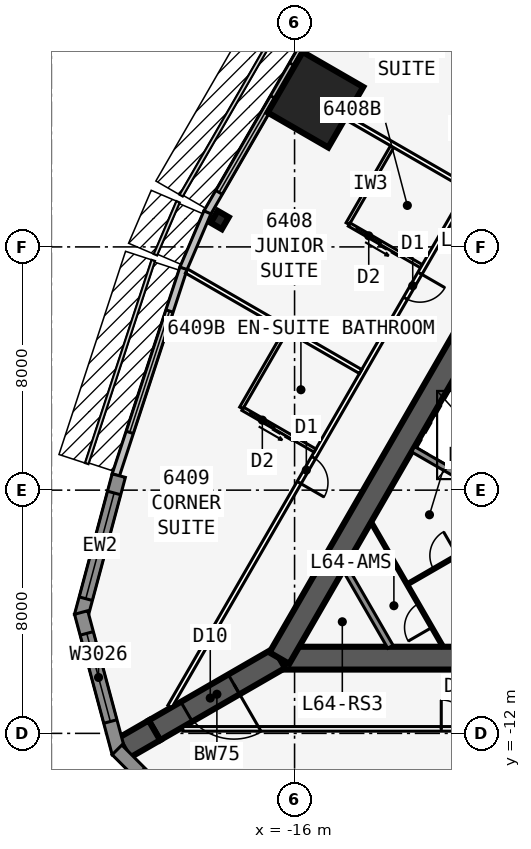
"""IFC4 building model, lengths in metres.
Left out: names, types, materials, properties, quantities, classifications, styles, units other than length and angle.
Written with IfcOpenShell. Run it as: python <this file> out.ifc"""

import sys

from ifc_helpers import new_model, si_unit, direction, frame, frame_2d, origin, origin_2d, place, context, subcontext, project, spatial, polyline, rectangle, i_section, outline, extrude, element, fill, save


model = new_model("IFC4")
c1 = context("Model", 3, precision=1e-05, world=origin(), true_north=direction((0.0, 1.0)))
c2 = subcontext(c1, "Body", "Model", "MODEL_VIEW")
j1 = project(units=[si_unit("LENGTHUNIT", "METRE"), si_unit("PLANEANGLEUNIT", "RADIAN")], contexts=[c1])
p1 = place(None, origin())
s1 = spatial("IfcSite", under=j1, at=p1, CompositionType="ELEMENT")
p2 = place(p1, origin())
s2 = spatial("IfcBuilding", under=s1, at=p2, CompositionType="ELEMENT")
p3 = place(p2, frame((0.0, 0.0, 242.9)))
s3 = spatial("IfcBuildingStorey", under=s2, at=p3, CompositionType="ELEMENT", Elevation=242.9)
p4 = place(p3, frame((-16.5, -9.526, 0.0), z_axis=(0.0, 0.0, 1.0), x_axis=(1.0, 0.0, 0.0)))
e1 = element("IfcWall", 1, at=p4, inside=s3, PredefinedType="SHEAR", context=c2, shape_type="SweptSolid", body=[
    extrude(rectangle(XDim=33.0, YDim=0.75, at=frame_2d((16.5, 0.0))), origin(), (0.0, 0.0, 1.0), 3.6),
])
p5 = place(p4, frame((14.05, 0.0, 0.0)))
e2 = element("IfcOpeningElement", 2, at=p5, cuts=e1, PredefinedType="OPENING", context=c2, shape_type="SweptSolid", body=[
    extrude(rectangle(XDim=1.8, YDim=2.13, at=frame_2d((0.9, 1.065))), frame((0.0, 0.385, 0.0), z_axis=(0.0, -1.0, 0.0), x_axis=(1.0, 0.0, 0.0)), (0.0, 0.0, 1.0), 0.77),
])
p6 = place(p3, frame((0.0, 19.052, 0.0), z_axis=(0.0, 0.0, 1.0), x_axis=(-0.499999749417, -0.866025548458, 0.0)))
e3 = element("IfcWall", 3, at=p6, inside=s3, PredefinedType="SHEAR", context=c2, shape_type="SweptSolid", body=[
    extrude(rectangle(XDim=33.0, YDim=0.75, at=frame_2d((16.5, 0.0))), origin(), (0.0, 0.0, 1.0), 3.6),
])
p7 = place(p6, frame((14.15, 0.0, 0.0)))
e4 = element("IfcOpeningElement", 4, at=p7, cuts=e3, PredefinedType="OPENING", context=c2, shape_type="SweptSolid", body=[
    extrude(rectangle(XDim=1.8, YDim=2.13, at=frame_2d((0.9, 1.065))), frame((0.0, 0.385, 0.0), z_axis=(0.0, -1.0, 0.0), x_axis=(1.0, 0.0, 0.0)), (0.0, 0.0, 1.0), 0.77),
])
p8 = place(p6, frame((12.6, 0.0, 0.0)))
e5 = element("IfcOpeningElement", 5, at=p8, cuts=e3, PredefinedType="OPENING", context=c2, shape_type="SweptSolid", body=[
    extrude(rectangle(XDim=1.0, YDim=2.13, at=frame_2d((0.5, 1.065))), frame((0.0, 0.385, 0.0), z_axis=(0.0, -1.0, 0.0), x_axis=(1.0, 0.0, 0.0)), (0.0, 0.0, 1.0), 0.77),
])
p9 = place(p3, frame((-9.329, -4.256, 0.0), z_axis=(0.0, 0.0, 1.0), x_axis=(-0.866022944154, 0.50000426018, 0.0)))
e6 = element("IfcWall", 6, at=p9, inside=s3, PredefinedType="SOLIDWALL", context=c2, shape_type="SweptSolid", body=[
    extrude(rectangle(XDim=3.2, YDim=0.2, at=frame_2d((1.6, 0.0))), origin(), (0.0, 0.0, 1.0), 3.435),
])
p10 = place(p3, frame((-16.5, -9.526, 0.0), z_axis=(0.0, 0.0, 1.0), x_axis=(-0.866031398331, -0.499989616998, 0.0)))
e7 = element("IfcWall", 7, at=p10, inside=s3, PredefinedType="SHEAR", context=c2, shape_type="SweptSolid", body=[
    extrude(rectangle(XDim=4.746, YDim=0.75, at=frame_2d((2.373, 0.0))), origin(), (0.0, 0.0, 1.0), 3.6),
])
p11 = place(p10, frame((1.725, 0.0, 0.0)))
e8 = element("IfcOpeningElement", 8, at=p11, cuts=e7, PredefinedType="OPENING", context=c2, shape_type="SweptSolid", body=[
    extrude(rectangle(XDim=1.8, YDim=2.13, at=frame_2d((0.9, 1.065))), frame((0.0, 0.385, 0.0), z_axis=(0.0, -1.0, 0.0), x_axis=(1.0, 0.0, 0.0)), (0.0, 0.0, 1.0), 0.77),
])
p12 = place(p3, frame((-20.61, -11.899, 0.0), z_axis=(0.0, 0.0, 1.0), x_axis=(-0.866009537788, -0.500027479704, 0.0)))
e9 = element("IfcWall", 9, at=p12, inside=s3, PredefinedType="SHEAR", context=c2, shape_type="SweptSolid", body=[
    extrude(rectangle(XDim=1.155, YDim=0.75, at=frame_2d((0.577, 0.0))), origin(), (0.0, 0.0, 1.0), 3.6),
])
p13 = place(p3, frame((-18.461, 4.885, 0.0), z_axis=(0.0, 0.0, 1.0), x_axis=(-0.866025403784, 0.5, 0.0)))
e10 = element("IfcColumn", 10, at=p13, inside=s3, PredefinedType="COLUMN", context=c2, shape_type="SweptSolid", body=[
    extrude(i_section(OverallWidth=0.419, OverallDepth=0.455, WebThickness=0.042, FlangeThickness=0.068, at=origin_2d()), origin(), (0.0, 0.0, 1.0), 3.6),
])
p14 = place(p3, frame((-15.312, 8.84, 0.0), z_axis=(0.0, 0.0, 1.0), x_axis=(-0.866025403784, 0.5, 0.0)))
e11 = element("IfcColumn", 11, at=p14, inside=s3, PredefinedType="COLUMN", context=c2, shape_type="SweptSolid", body=[
    extrude(rectangle(XDim=2.3, YDim=2.3, at=origin_2d()), origin(), (0.0, 0.0, 1.0), 3.6),
])
p15 = place(p3, frame((-13.873, 13.783, 0.0), z_axis=(0.0, 0.0, 1.0), x_axis=(-0.499993662806, -0.866029062534, 0.0)))
e12 = element("IfcWall", 12, at=p15, inside=s3, PredefinedType="STANDARD", context=c2, shape_type="SweptSolid", body=[
    extrude(rectangle(XDim=10.0, YDim=0.25, at=frame_2d((5.0, 0.0))), origin(), (0.0, 0.0, 1.0), 3.435),
])
p16 = place(p15, frame((0.775, 0.0, 0.45)))
e13 = element("IfcOpeningElement", 13, at=p16, cuts=e12, PredefinedType="OPENING", context=c2, shape_type="SweptSolid", body=[
    extrude(rectangle(XDim=3.6, YDim=2.6, at=frame_2d((1.8, 1.3))), frame((0.0, 0.135, 0.0), z_axis=(0.0, -1.0, 0.0), x_axis=(1.0, 0.0, 0.0)), (0.0, 0.0, 1.0), 0.27),
])
p17 = place(p15, frame((5.625, 0.0, 0.45)))
e14 = element("IfcOpeningElement", 14, at=p17, cuts=e12, PredefinedType="OPENING", context=c2, shape_type="SweptSolid", body=[
    extrude(rectangle(XDim=3.6, YDim=2.6, at=frame_2d((1.8, 1.3))), frame((0.0, 0.135, 0.0), z_axis=(0.0, -1.0, 0.0), x_axis=(1.0, 0.0, 0.0)), (0.0, 0.0, 1.0), 0.27),
])
p18 = place(p3, frame((-18.866, 5.136, 0.0), z_axis=(0.0, 0.0, 1.0), x_axis=(-0.393290226175, -0.91941437774, 0.0)))
e15 = element("IfcWall", 15, at=p18, inside=s3, PredefinedType="STANDARD", context=c2, shape_type="SweptSolid", body=[
    extrude(rectangle(XDim=2.014, YDim=0.25, at=frame_2d((1.007, 0.0))), origin(), (0.0, 0.0, 1.0), 3.435),
])
p19 = place(p3, frame((-19.654, 3.294, 0.0), z_axis=(0.0, 0.0, 1.0), x_axis=(-0.311328857048, -0.95030223759, 0.0)))
e16 = element("IfcWall", 16, at=p19, inside=s3, PredefinedType="STANDARD", context=c2, shape_type="SweptSolid", body=[
    extrude(rectangle(XDim=7.153, YDim=0.25, at=frame_2d((3.576, 0.0))), origin(), (0.0, 0.0, 1.0), 3.435),
])
p20 = place(p19, frame((1.476, 0.0, 0.45)))
e17 = element("IfcOpeningElement", 17, at=p20, cuts=e16, PredefinedType="OPENING", context=c2, shape_type="SweptSolid", body=[
    extrude(rectangle(XDim=4.2, YDim=2.6, at=frame_2d((2.1, 1.3))), frame((0.0, 0.135, 0.0), z_axis=(0.0, -1.0, 0.0), x_axis=(1.0, 0.0, 0.0)), (0.0, 0.0, 1.0), 0.27),
])
p21 = place(p3, frame((-21.783, -3.522, 0.0), z_axis=(0.0, 0.0, 1.0), x_axis=(-0.25880328844, -0.965930048136, 0.0)))
e18 = element("IfcWall", 18, at=p21, inside=s3, PredefinedType="SOLIDWALL", context=c2, shape_type="SweptSolid", body=[
    extrude(rectangle(XDim=4.782, YDim=0.45, at=frame_2d((2.391, 0.0))), origin(), (0.0, 0.0, 1.0), 3.435),
])
p22 = place(p21, frame((0.591, 0.0, 0.45)))
e19 = element("IfcOpeningElement", 19, at=p22, cuts=e18, PredefinedType="OPENING", context=c2, shape_type="SweptSolid", body=[
    extrude(rectangle(XDim=3.6, YDim=2.6, at=frame_2d((1.8, 1.3))), frame((0.0, 0.235, 0.0), z_axis=(0.0, -1.0, 0.0), x_axis=(1.0, 0.0, 0.0)), (0.0, 0.0, 1.0), 0.47),
])
p23 = place(p3, frame((-23.02, -8.025, 0.0), z_axis=(0.0, 0.0, 1.0), x_axis=(0.25880328844, -0.965930048136, 0.0)))
e20 = element("IfcWall", 20, at=p23, inside=s3, PredefinedType="SOLIDWALL", context=c2, shape_type="SweptSolid", body=[
    extrude(outline(polyline([(4.782, 0.225), (4.722, 0.225), (4.303, 0.113), (4.273, 0.225), (0.0, 0.225), (0.0, -0.225), (4.782, -0.225), (4.782, 0.225)])), origin(), (0.0, 0.0, 1.0), 3.435),
])
p24 = place(p23, frame((0.711, 0.0, 0.45)))
e21 = element("IfcOpeningElement", 21, at=p24, cuts=e20, PredefinedType="OPENING", context=c2, shape_type="SweptSolid", body=[
    extrude(rectangle(XDim=3.0, YDim=2.6, at=frame_2d((1.5, 1.3))), frame((0.0, 0.235, 0.0), z_axis=(0.0, -1.0, 0.0), x_axis=(1.0, 0.0, 0.0)), (0.0, 0.0, 1.0), 0.47),
])
p25 = place(p3, frame((-21.841, -12.542, 0.0), z_axis=(0.0, 0.0, 1.0), x_axis=(0.707081252484, -0.707132308968, 0.0)))
e22 = element("IfcWall", 22, at=p25, inside=s3, PredefinedType="SOLIDWALL", context=c2, shape_type="SweptSolid", body=[
    extrude(outline(polyline([(4.782, 0.225), (0.509, 0.225), (0.479, 0.113), (0.059, 0.225), (0.0, 0.225), (0.0, -0.225), (4.782, -0.225), (4.782, 0.225)])), origin(), (0.0, 0.0, 1.0), 3.435),
])
p26 = place(p25, frame((1.07, 0.0, 0.45)))
e23 = element("IfcOpeningElement", 23, at=p26, cuts=e22, PredefinedType="OPENING", context=c2, shape_type="SweptSolid", body=[
    extrude(rectangle(XDim=3.0, YDim=2.6, at=frame_2d((1.5, 1.3))), frame((0.0, 0.235, 0.0), z_axis=(0.0, -1.0, 0.0), x_axis=(1.0, 0.0, 0.0)), (0.0, 0.0, 1.0), 0.47),
])
p27 = place(p3, frame((-19.677, -11.851, 0.0), z_axis=(0.0, 0.0, 1.0), x_axis=(1.0, 0.0, 0.0)))
e24 = element("IfcWall", 24, at=p27, inside=s3, PredefinedType="PARTITIONING", context=c2, shape_type="SweptSolid", body=[
    extrude(rectangle(XDim=39.354, YDim=0.15, at=frame_2d((19.677, 0.0))), origin(), (0.0, 0.0, 1.0), 3.435),
])
p28 = place(p27, frame((8.502, 0.0, 0.0)))
e25 = element("IfcOpeningElement", 25, at=p28, cuts=e24, PredefinedType="OPENING", context=c2, shape_type="SweptSolid", body=[
    extrude(rectangle(XDim=0.95, YDim=2.13, at=frame_2d((0.475, 1.065))), frame((0.0, 0.085, 0.0), z_axis=(0.0, -1.0, 0.0), x_axis=(1.0, 0.0, 0.0)), (0.0, 0.0, 1.0), 0.17),
])
p29 = place(p27, frame((15.677, 0.0, 0.0)))
e26 = element("IfcOpeningElement", 26, at=p29, cuts=e24, PredefinedType="OPENING", context=c2, shape_type="SweptSolid", body=[
    extrude(rectangle(XDim=1.0, YDim=2.13, at=frame_2d((0.5, 1.065))), frame((0.0, 0.085, 0.0), z_axis=(0.0, -1.0, 0.0), x_axis=(1.0, 0.0, 0.0)), (0.0, 0.0, 1.0), 0.17),
])
p30 = place(p27, frame((22.902, 0.0, 0.0)))
e27 = element("IfcOpeningElement", 27, at=p30, cuts=e24, PredefinedType="OPENING", context=c2, shape_type="SweptSolid", body=[
    extrude(rectangle(XDim=0.95, YDim=2.13, at=frame_2d((0.475, 1.065))), frame((0.0, 0.085, 0.0), z_axis=(0.0, -1.0, 0.0), x_axis=(1.0, 0.0, 0.0)), (0.0, 0.0, 1.0), 0.17),
])
p31 = place(p27, frame((29.902, 0.0, 0.0)))
e28 = element("IfcOpeningElement", 28, at=p31, cuts=e24, PredefinedType="OPENING", context=c2, shape_type="SweptSolid", body=[
    extrude(rectangle(XDim=0.95, YDim=2.13, at=frame_2d((0.475, 1.065))), frame((0.0, 0.085, 0.0), z_axis=(0.0, -1.0, 0.0), x_axis=(1.0, 0.0, 0.0)), (0.0, 0.0, 1.0), 0.17),
])
p32 = place(p3, frame((-0.425, 22.966, 0.0), z_axis=(0.0, 0.0, 1.0), x_axis=(-0.500000265775, -0.866025250339, 0.0)))
e29 = element("IfcWall", 29, at=p32, inside=s3, PredefinedType="PARTITIONING", context=c2, shape_type="SweptSolid", body=[
    extrude(rectangle(XDim=39.354, YDim=0.15, at=frame_2d((19.677, 0.0))), origin(), (0.0, 0.0, 1.0), 3.435),
])
p33 = place(p32, frame((8.502, 0.0, 0.0)))
e30 = element("IfcOpeningElement", 30, at=p33, cuts=e29, PredefinedType="OPENING", context=c2, shape_type="SweptSolid", body=[
    extrude(rectangle(XDim=0.95, YDim=2.13, at=frame_2d((0.475, 1.065))), frame((0.0, 0.085, 0.0), z_axis=(0.0, -1.0, 0.0), x_axis=(1.0, 0.0, 0.0)), (0.0, 0.0, 1.0), 0.17),
])
p34 = place(p32, frame((15.902, 0.0, 0.0)))
e31 = element("IfcOpeningElement", 31, at=p34, cuts=e29, PredefinedType="OPENING", context=c2, shape_type="SweptSolid", body=[
    extrude(rectangle(XDim=0.95, YDim=2.13, at=frame_2d((0.475, 1.065))), frame((0.0, 0.085, 0.0), z_axis=(0.0, -1.0, 0.0), x_axis=(1.0, 0.0, 0.0)), (0.0, 0.0, 1.0), 0.17),
])
p35 = place(p32, frame((22.902, 0.0, 0.0)))
e32 = element("IfcOpeningElement", 32, at=p35, cuts=e29, PredefinedType="OPENING", context=c2, shape_type="SweptSolid", body=[
    extrude(rectangle(XDim=0.95, YDim=2.13, at=frame_2d((0.475, 1.065))), frame((0.0, 0.085, 0.0), z_axis=(0.0, -1.0, 0.0), x_axis=(1.0, 0.0, 0.0)), (0.0, 0.0, 1.0), 0.17),
])
p36 = place(p32, frame((29.902, 0.0, 0.0)))
e33 = element("IfcOpeningElement", 33, at=p36, cuts=e29, PredefinedType="OPENING", context=c2, shape_type="SweptSolid", body=[
    extrude(rectangle(XDim=0.95, YDim=2.13, at=frame_2d((0.475, 1.065))), frame((0.0, 0.085, 0.0), z_axis=(0.0, -1.0, 0.0), x_axis=(1.0, 0.0, 0.0)), (0.0, 0.0, 1.0), 0.17),
])
p37 = place(p3, frame((-10.329, 5.963, 0.0), z_axis=(0.0, 0.0, 1.0), x_axis=(-0.866011785882, 0.500023586156, 0.0)))
e34 = element("IfcWall", 34, at=p37, inside=s3, PredefinedType="PARTITIONING", context=c2, shape_type="SweptSolid", body=[
    extrude(rectangle(XDim=6.854, YDim=0.15, at=frame_2d((3.427, 0.0))), origin(), (0.0, 0.0, 1.0), 2.678),
])
p38 = place(p3, frame((-13.829, -0.099, 0.0), z_axis=(0.0, 0.0, 1.0), x_axis=(-0.866022562216, 0.500004921708, 0.0)))
e35 = element("IfcWall", 35, at=p38, inside=s3, PredefinedType="PARTITIONING", context=c2, shape_type="SweptSolid", body=[
    extrude(rectangle(XDim=6.609, YDim=0.15, at=frame_2d((3.304, 0.0))), origin(), (0.0, 0.0, 1.0), 2.678),
])
p39 = place(p3, frame((-12.753, 7.363, 0.0), z_axis=(0.0, 0.0, 1.0), x_axis=(-0.50002537861, -0.866010750942, 0.0)))
e36 = element("IfcWall", 36, at=p39, inside=s3, PredefinedType="PLUMBINGWALL", context=c2, shape_type="SweptSolid", body=[
    extrude(rectangle(XDim=3.0, YDim=0.12, at=frame_2d((1.5, 0.0))), origin(), (0.0, 0.0, 1.0), 3.435),
])
p40 = place(p3, frame((-11.829, 3.365, 0.0), z_axis=(0.0, 0.0, 1.0), x_axis=(-0.865997131366, 0.500048966069, 0.0)))
e37 = element("IfcWall", 37, at=p40, inside=s3, PredefinedType="PLUMBINGWALL", context=c2, shape_type="SweptSolid", body=[
    extrude(rectangle(XDim=2.74, YDim=0.12, at=frame_2d((1.37, 0.0))), origin(), (0.0, 0.0, 1.0), 3.435),
])
p41 = place(p40, frame((1.55, 0.0, 0.0)))
e38 = element("IfcOpeningElement", 38, at=p41, cuts=e37, PredefinedType="OPENING", context=c2, shape_type="SweptSolid", body=[
    extrude(rectangle(XDim=0.9, YDim=2.13, at=frame_2d((0.45, 1.065))), frame((0.0, 0.07, 0.0), z_axis=(0.0, -1.0, 0.0), x_axis=(1.0, 0.0, 0.0)), (0.0, 0.0, 1.0), 0.14),
])
p42 = place(p3, frame((-16.253, 1.301, 0.0), z_axis=(0.0, 0.0, 1.0), x_axis=(-0.499990139034, -0.866031096941, 0.0)))
e39 = element("IfcWall", 39, at=p42, inside=s3, PredefinedType="PLUMBINGWALL", context=c2, shape_type="SweptSolid", body=[
    extrude(rectangle(XDim=3.0, YDim=0.12, at=frame_2d((1.5, 0.0))), origin(), (0.0, 0.0, 1.0), 3.435),
])
p43 = place(p3, frame((-15.329, -2.697, 0.0), z_axis=(0.0, 0.0, 1.0), x_axis=(-0.866035715982, 0.499982138324, 0.0)))
e40 = element("IfcWall", 40, at=p43, inside=s3, PredefinedType="PLUMBINGWALL", context=c2, shape_type="SweptSolid", body=[
    extrude(rectangle(XDim=2.74, YDim=0.12, at=frame_2d((1.37, 0.0))), origin(), (0.0, 0.0, 1.0), 3.435),
])
p44 = place(p43, frame((1.55, 0.0, 0.0)))
e41 = element("IfcOpeningElement", 41, at=p44, cuts=e40, PredefinedType="OPENING", context=c2, shape_type="SweptSolid", body=[
    extrude(rectangle(XDim=0.9, YDim=2.13, at=frame_2d((0.45, 1.065))), frame((0.0, 0.07, 0.0), z_axis=(0.0, -1.0, 0.0), x_axis=(1.0, 0.0, 0.0)), (0.0, 0.0, 1.0), 0.14),
])
p45 = place(p3, frame((-12.848, -9.151, 0.0), z_axis=(0.0, 0.0, 1.0), x_axis=(-0.499952404951, 0.866052881055, 0.0)))
e42 = element("IfcWall", 42, at=p45, inside=s3, PredefinedType="SOLIDWALL", context=c2, shape_type="SweptSolid", body=[
    extrude(rectangle(XDim=3.002, YDim=0.2, at=frame_2d((1.501, 0.0))), origin(), (0.0, 0.0, 1.0), 3.435),
])
p46 = place(p3, frame((-11.116, -9.151, 0.0), z_axis=(0.0, 0.0, 1.0), x_axis=(-0.499999210213, 0.866025859768, 0.0)))
e43 = element("IfcWall", 43, at=p46, inside=s3, PredefinedType="PARTITIONING", context=c2, shape_type="SweptSolid", body=[
    extrude(rectangle(XDim=4.734, YDim=0.1, at=frame_2d((2.367, 0.0))), origin(), (0.0, 0.0, 1.0), 3.435),
])
p47 = place(p46, frame((0.734, 0.0, 0.0)))
e44 = element("IfcOpeningElement", 44, at=p47, cuts=e43, PredefinedType="OPENING", context=c2, shape_type="SweptSolid", body=[
    extrude(rectangle(XDim=0.9, YDim=2.13, at=frame_2d((0.45, 1.065))), frame((0.0, 0.06, 0.0), z_axis=(0.0, -1.0, 0.0), x_axis=(1.0, 0.0, 0.0)), (0.0, 0.0, 1.0), 0.12),
])
p48 = place(p3, frame((-12.3, -7.101, 0.0), z_axis=(0.0, 0.0, 1.0), x_axis=(0.866022978719, 0.500004200313, 0.0)))
e45 = element("IfcWall", 45, at=p48, inside=s3, PredefinedType="PARTITIONING", context=c2, shape_type="SweptSolid", body=[
    extrude(rectangle(XDim=2.425, YDim=0.1, at=frame_2d((1.213, 0.0))), origin(), (0.0, 0.0, 1.0), 3.435),
])
p49 = place(p48, frame((1.005, 0.0, 0.0)))
e46 = element("IfcOpeningElement", 46, at=p49, cuts=e45, PredefinedType="OPENING", context=c2, shape_type="SweptSolid", body=[
    extrude(rectangle(XDim=0.9, YDim=2.13, at=frame_2d((0.45, 1.065))), frame((0.0, 0.06, 0.0), z_axis=(0.0, -1.0, 0.0), x_axis=(1.0, 0.0, 0.0)), (0.0, 0.0, 1.0), 0.12),
])
p50 = place(p16, origin())
e47 = element("IfcWindow", 47, at=p50, inside=s3, PartitioningType="SINGLE_PANEL", PredefinedType="WINDOW", context=c2, shape_type="SweptSolid", body=[
    extrude(rectangle(XDim=3.6, YDim=2.6, at=frame_2d((1.8, 1.3))), frame((0.0, 0.03, 0.0), z_axis=(0.0, -1.0, 0.0), x_axis=(1.0, 0.0, 0.0)), (0.0, 0.0, 1.0), 0.06),
])
fill(e13, e47)
p51 = place(p17, origin())
e48 = element("IfcWindow", 48, at=p51, inside=s3, PartitioningType="SINGLE_PANEL", PredefinedType="WINDOW", context=c2, shape_type="SweptSolid", body=[
    extrude(rectangle(XDim=3.6, YDim=2.6, at=frame_2d((1.8, 1.3))), frame((0.0, 0.03, 0.0), z_axis=(0.0, -1.0, 0.0), x_axis=(1.0, 0.0, 0.0)), (0.0, 0.0, 1.0), 0.06),
])
fill(e14, e48)
p52 = place(p20, origin())
e49 = element("IfcWindow", 49, at=p52, inside=s3, PartitioningType="SINGLE_PANEL", PredefinedType="WINDOW", context=c2, shape_type="SweptSolid", body=[
    extrude(rectangle(XDim=4.2, YDim=2.6, at=frame_2d((2.1, 1.3))), frame((0.0, 0.03, 0.0), z_axis=(0.0, -1.0, 0.0), x_axis=(1.0, 0.0, 0.0)), (0.0, 0.0, 1.0), 0.06),
])
fill(e17, e49)
p53 = place(p22, origin())
e50 = element("IfcWindow", 50, at=p53, inside=s3, PartitioningType="SINGLE_PANEL", PredefinedType="WINDOW", context=c2, shape_type="SweptSolid", body=[
    extrude(rectangle(XDim=3.6, YDim=2.6, at=frame_2d((1.8, 1.3))), frame((0.0, 0.03, 0.0), z_axis=(0.0, -1.0, 0.0), x_axis=(1.0, 0.0, 0.0)), (0.0, 0.0, 1.0), 0.06),
])
fill(e19, e50)
p54 = place(p24, origin())
e51 = element("IfcWindow", 51, at=p54, inside=s3, PartitioningType="SINGLE_PANEL", PredefinedType="WINDOW", context=c2, shape_type="SweptSolid", body=[
    extrude(rectangle(XDim=3.0, YDim=2.6, at=frame_2d((1.5, 1.3))), frame((0.0, 0.03, 0.0), z_axis=(0.0, -1.0, 0.0), x_axis=(1.0, 0.0, 0.0)), (0.0, 0.0, 1.0), 0.06),
])
fill(e21, e51)
p55 = place(p28, origin())
e52 = element("IfcDoor", 52, at=p55, inside=s3, OperationType="SINGLE_SWING_LEFT", PredefinedType="DOOR", context=c2, shape_type="SweptSolid", body=[
    extrude(rectangle(XDim=0.95, YDim=2.13, at=frame_2d((0.475, 1.065))), frame((0.0, 0.025, 0.0), z_axis=(0.0, -1.0, 0.0), x_axis=(1.0, 0.0, 0.0)), (0.0, 0.0, 1.0), 0.05),
])
fill(e25, e52)
p56 = place(p41, origin())
e53 = element("IfcDoor", 53, at=p56, inside=s3, OperationType="SLIDING_TO_LEFT", PredefinedType="DOOR", context=c2, shape_type="SweptSolid", body=[
    extrude(rectangle(XDim=0.9, YDim=2.13, at=frame_2d((0.45, 1.065))), frame((0.0, 0.025, 0.0), z_axis=(0.0, -1.0, 0.0), x_axis=(1.0, 0.0, 0.0)), (0.0, 0.0, 1.0), 0.05),
])
fill(e38, e53)
p57 = place(p35, origin())
e54 = element("IfcDoor", 54, at=p57, inside=s3, OperationType="SINGLE_SWING_LEFT", PredefinedType="DOOR", context=c2, shape_type="SweptSolid", body=[
    extrude(rectangle(XDim=0.95, YDim=2.13, at=frame_2d((0.475, 1.065))), frame((0.0, 0.025, 0.0), z_axis=(0.0, -1.0, 0.0), x_axis=(1.0, 0.0, 0.0)), (0.0, 0.0, 1.0), 0.05),
])
fill(e32, e54)
p58 = place(p44, origin())
e55 = element("IfcDoor", 55, at=p58, inside=s3, OperationType="SLIDING_TO_LEFT", PredefinedType="DOOR", context=c2, shape_type="SweptSolid", body=[
    extrude(rectangle(XDim=0.9, YDim=2.13, at=frame_2d((0.45, 1.065))), frame((0.0, 0.025, 0.0), z_axis=(0.0, -1.0, 0.0), x_axis=(1.0, 0.0, 0.0)), (0.0, 0.0, 1.0), 0.05),
])
fill(e41, e55)
p59 = place(p36, origin())
e56 = element("IfcDoor", 56, at=p59, inside=s3, OperationType="SINGLE_SWING_RIGHT", PredefinedType="DOOR", context=c2, shape_type="SweptSolid", body=[
    extrude(rectangle(XDim=0.95, YDim=2.13, at=frame_2d((0.475, 1.065))), frame((0.0, 0.025, 0.0), z_axis=(0.0, -1.0, 0.0), x_axis=(1.0, 0.0, 0.0)), (0.0, 0.0, 1.0), 0.05),
])
fill(e33, e56)
p60 = place(p11, origin())
e57 = element("IfcDoor", 57, at=p60, inside=s3, OperationType="DOUBLE_DOOR_DOUBLE_SWING", PredefinedType="DOOR", context=c2, shape_type="SweptSolid", body=[
    extrude(rectangle(XDim=1.8, YDim=2.13, at=frame_2d((0.9, 1.065))), frame((0.0, 0.025, 0.0), z_axis=(0.0, -1.0, 0.0), x_axis=(1.0, 0.0, 0.0)), (0.0, 0.0, 1.0), 0.05),
])
fill(e8, e57)
p61 = place(p47, origin())
e58 = element("IfcDoor", 58, at=p61, inside=s3, OperationType="SINGLE_SWING_LEFT", PredefinedType="DOOR", context=c2, shape_type="SweptSolid", body=[
    extrude(rectangle(XDim=0.9, YDim=2.13, at=frame_2d((0.45, 1.065))), frame((0.0, 0.025, 0.0), z_axis=(0.0, -1.0, 0.0), x_axis=(1.0, 0.0, 0.0)), (0.0, 0.0, 1.0), 0.05),
])
fill(e44, e58)
p62 = place(p49, origin())
e59 = element("IfcDoor", 59, at=p62, inside=s3, OperationType="SINGLE_SWING_RIGHT", PredefinedType="DOOR", context=c2, shape_type="SweptSolid", body=[
    extrude(rectangle(XDim=0.9, YDim=2.13, at=frame_2d((0.45, 1.065))), frame((0.0, 0.025, 0.0), z_axis=(0.0, -1.0, 0.0), x_axis=(1.0, 0.0, 0.0)), (0.0, 0.0, 1.0), 0.05),
])
fill(e46, e59)
save(model, sys.argv[1])
